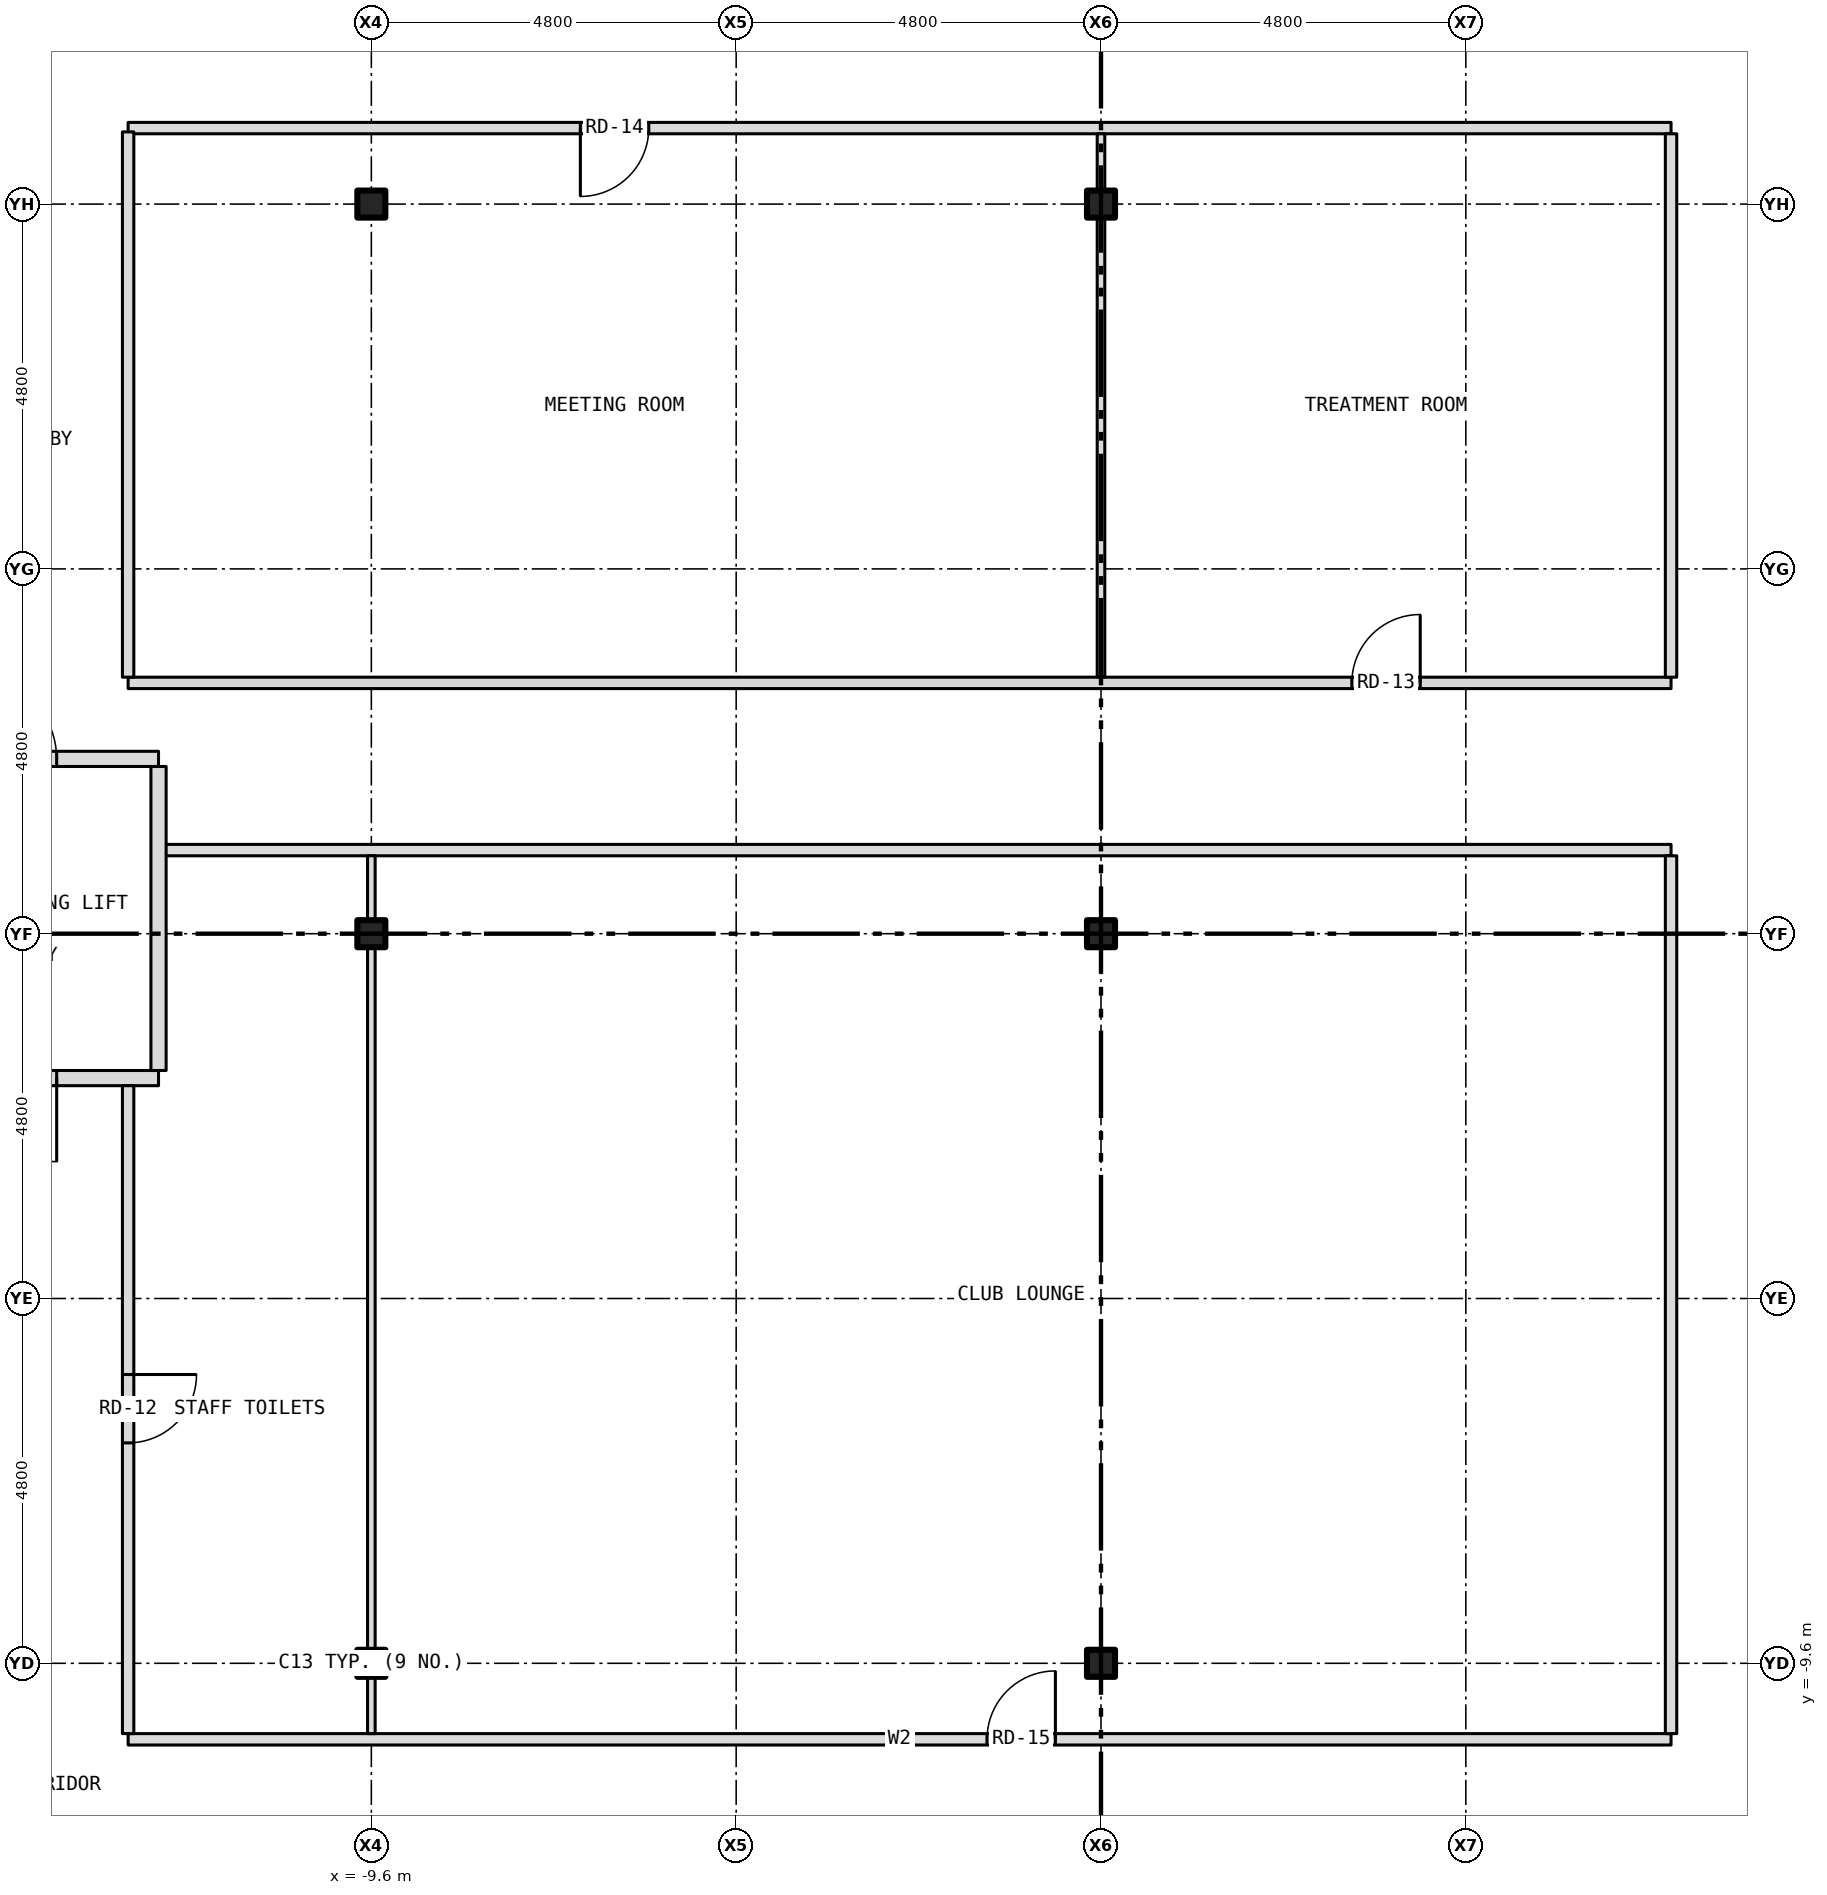
"""IFC4 building model, lengths in metres.
Left out: names, types, materials, properties, quantities, classifications, styles, units other than length and angle.
Written with IfcOpenShell. Run it as: python <this file> out.ifc"""

import sys

from ifc_helpers import new_model, si_unit, direction, frame, frame_2d, origin, origin_2d, place, context, subcontext, project, spatial, rectangle, i_section, extrude, element, fill, save


model = new_model("IFC4")
c1 = context("Model", 3, precision=1e-05, world=origin(), true_north=direction((0.0, 1.0)))
c2 = subcontext(c1, "Body", "Model", "MODEL_VIEW")
j1 = project(units=[si_unit("LENGTHUNIT", "METRE"), si_unit("PLANEANGLEUNIT", "RADIAN")], contexts=[c1])
p1 = place(None, origin())
s1 = spatial("IfcSite", under=j1, at=p1, CompositionType="ELEMENT")
p2 = place(p1, origin())
s2 = spatial("IfcBuilding", under=s1, at=p2, CompositionType="ELEMENT")
p3 = place(p2, frame((0.0, 0.0, 244.5)))
s3 = spatial("IfcBuildingStorey", under=s2, at=p3, CompositionType="ELEMENT", Elevation=244.5)
for number, where, z_axis, x_axis in (
    (1, (-9.6, -9.6, -0.15), (0.0, 0.0, 1.0), (1.0, 0.0, 0.0)),
    (2, (-9.6, 0.0, -0.15), (0.0, 0.0, 1.0), (1.0, 0.0, 0.0)),
    (3, (-9.6, 9.6, -0.15), (0.0, 0.0, 1.0), (1.0, 0.0, 0.0)),
    (4, (0.0, -9.6, -0.15), (0.0, 0.0, 1.0), (1.0, 0.0, 0.0)),
    (5, (0.0, 0.0, -0.15), (0.0, 0.0, 1.0), (1.0, 0.0, 0.0)),
    (6, (0.0, 9.6, -0.15), (0.0, 0.0, 1.0), (1.0, 0.0, 0.0)),
):
    element("IfcColumn", number, at=place(p3, frame(where, z_axis=z_axis, x_axis=x_axis)), inside=s3, PredefinedType="COLUMN", context=c2, shape_type="SweptSolid", body=[
        extrude(i_section(OverallWidth=0.368, OverallDepth=0.356, WebThickness=0.011, FlangeThickness=0.018, at=origin_2d()), origin(), (0.0, 0.0, 1.0), 3.5),
    ])
p4 = place(p3, frame((-12.8, -10.6, 0.0), z_axis=(0.0, 0.0, 1.0), x_axis=(1.0, 0.0, 0.0)))
e7 = element("IfcWall", 7, at=p4, inside=s3, PredefinedType="PARTITIONING", context=c2, shape_type="SweptSolid", body=[
    extrude(rectangle(XDim=20.3, YDim=0.15, at=frame_2d((10.15, 0.0))), origin(), (0.0, 0.0, 1.0), 3.35),
])
p5 = place(p4, frame((11.3, 0.0, 0.0)))
e8 = element("IfcOpeningElement", 8, at=p5, cuts=e7, PredefinedType="OPENING", context=c2, shape_type="SweptSolid", body=[
    extrude(rectangle(XDim=0.9, YDim=2.1, at=frame_2d((0.45, 1.05))), frame((0.0, 0.087, 0.0), z_axis=(0.0, -1.0, 0.0), x_axis=(1.0, 0.0, 0.0)), (0.0, 0.0, 1.0), 0.174),
])
p6 = place(p3, frame((-15.68, -1.9, 0.0), z_axis=(0.0, 0.0, 1.0), x_axis=(1.0, 0.0, 0.0)))
e9 = element("IfcWall", 9, at=p6, inside=s3, PredefinedType="PARTITIONING", context=c2, shape_type="SweptSolid", body=[
    extrude(rectangle(XDim=3.28, YDim=0.2, at=frame_2d((1.64, 0.0))), origin(), (0.0, 0.0, 1.0), 3.35),
])
p7 = place(p6, frame((0.84, 0.0, 0.0)))
e10 = element("IfcOpeningElement", 10, at=p7, cuts=e9, PredefinedType="OPENING", context=c2, shape_type="SweptSolid", body=[
    extrude(rectangle(XDim=1.1, YDim=2.1, at=frame_2d((0.55, 1.05))), frame((0.0, 0.112, 0.0), z_axis=(0.0, -1.0, 0.0), x_axis=(1.0, 0.0, 0.0)), (0.0, 0.0, 1.0), 0.224),
])
p8 = place(p3, frame((-12.4, 1.1, 0.0), z_axis=(0.0, 0.0, 1.0), x_axis=(1.0, 0.0, 0.0)))
e11 = element("IfcWall", 11, at=p8, inside=s3, PredefinedType="PARTITIONING", context=c2, shape_type="SweptSolid", body=[
    extrude(rectangle(XDim=19.9, YDim=0.15, at=frame_2d((9.95, 0.0))), origin(), (0.0, 0.0, 1.0), 3.35),
])
p9 = place(p3, frame((-15.68, 2.3, 0.0), z_axis=(0.0, 0.0, 1.0), x_axis=(1.0, 0.0, 0.0)))
e12 = element("IfcWall", 12, at=p9, inside=s3, PredefinedType="PARTITIONING", context=c2, shape_type="SweptSolid", body=[
    extrude(rectangle(XDim=3.28, YDim=0.2, at=frame_2d((1.64, 0.0))), origin(), (0.0, 0.0, 1.0), 3.35),
])
p10 = place(p9, frame((0.84, 0.0, 0.0)))
e13 = element("IfcOpeningElement", 13, at=p10, cuts=e12, PredefinedType="OPENING", context=c2, shape_type="SweptSolid", body=[
    extrude(rectangle(XDim=1.1, YDim=2.1, at=frame_2d((0.55, 1.05))), frame((0.0, 0.112, 0.0), z_axis=(0.0, -1.0, 0.0), x_axis=(1.0, 0.0, 0.0)), (0.0, 0.0, 1.0), 0.224),
])
p11 = place(p3, frame((-12.8, 3.3, 0.0), z_axis=(0.0, 0.0, 1.0), x_axis=(1.0, 0.0, 0.0)))
e14 = element("IfcWall", 14, at=p11, inside=s3, PredefinedType="PARTITIONING", context=c2, shape_type="SweptSolid", body=[
    extrude(rectangle(XDim=20.3, YDim=0.15, at=frame_2d((10.15, 0.0))), origin(), (0.0, 0.0, 1.0), 3.35),
])
p12 = place(p11, frame((16.1, 0.0, 0.0)))
e15 = element("IfcOpeningElement", 15, at=p12, cuts=e14, PredefinedType="OPENING", context=c2, shape_type="SweptSolid", body=[
    extrude(rectangle(XDim=0.9, YDim=2.1, at=frame_2d((0.45, 1.05))), frame((0.0, 0.087, 0.0), z_axis=(0.0, -1.0, 0.0), x_axis=(1.0, 0.0, 0.0)), (0.0, 0.0, 1.0), 0.174),
])
p13 = place(p3, frame((-12.8, 10.6, 0.0), z_axis=(0.0, 0.0, 1.0), x_axis=(1.0, 0.0, 0.0)))
e16 = element("IfcWall", 16, at=p13, inside=s3, PredefinedType="PARTITIONING", context=c2, shape_type="SweptSolid", body=[
    extrude(rectangle(XDim=20.3, YDim=0.15, at=frame_2d((10.15, 0.0))), origin(), (0.0, 0.0, 1.0), 3.35),
])
p14 = place(p13, frame((5.95, 0.0, 0.0)))
e17 = element("IfcOpeningElement", 17, at=p14, cuts=e16, PredefinedType="OPENING", context=c2, shape_type="SweptSolid", body=[
    extrude(rectangle(XDim=0.9, YDim=2.1, at=frame_2d((0.45, 1.05))), frame((0.0, 0.087, 0.0), z_axis=(0.0, -1.0, 0.0), x_axis=(1.0, 0.0, 0.0)), (0.0, 0.0, 1.0), 0.174),
])
p15 = place(p3, frame((-12.8, -10.525, 0.0), z_axis=(0.0, 0.0, 1.0), x_axis=(0.0, 1.0, 0.0)))
e18 = element("IfcWall", 18, at=p15, inside=s3, PredefinedType="PARTITIONING", context=c2, shape_type="SweptSolid", body=[
    extrude(rectangle(XDim=8.525, YDim=0.15, at=frame_2d((4.262, 0.0))), origin(), (0.0, 0.0, 1.0), 3.35),
])
p16 = place(p15, frame((3.825, 0.0, 0.0)))
e19 = element("IfcOpeningElement", 19, at=p16, cuts=e18, PredefinedType="OPENING", context=c2, shape_type="SweptSolid", body=[
    extrude(rectangle(XDim=0.9, YDim=2.1, at=frame_2d((0.45, 1.05))), frame((0.0, 0.087, 0.0), z_axis=(0.0, -1.0, 0.0), x_axis=(1.0, 0.0, 0.0)), (0.0, 0.0, 1.0), 0.174),
])
p17 = place(p3, frame((-12.8, 3.375, 0.0), z_axis=(0.0, 0.0, 1.0), x_axis=(0.0, 1.0, 0.0)))
e20 = element("IfcWall", 20, at=p17, inside=s3, PredefinedType="PARTITIONING", context=c2, shape_type="SweptSolid", body=[
    extrude(rectangle(XDim=7.175, YDim=0.15, at=frame_2d((3.587, 0.0))), origin(), (0.0, 0.0, 1.0), 3.35),
])
p18 = place(p3, frame((-12.4, -1.8, 0.0), z_axis=(0.0, 0.0, 1.0), x_axis=(0.0, 1.0, 0.0)))
e21 = element("IfcWall", 21, at=p18, inside=s3, PredefinedType="PARTITIONING", context=c2, shape_type="SweptSolid", body=[
    extrude(rectangle(XDim=4.0, YDim=0.2, at=frame_2d((2.0, 0.0))), origin(), (0.0, 0.0, 1.0), 3.35),
])
p19 = place(p3, frame((-9.6, -10.525, 0.0), z_axis=(0.0, 0.0, 1.0), x_axis=(0.0, 1.0, 0.0)))
e22 = element("IfcWall", 22, at=p19, inside=s3, PredefinedType="PARTITIONING", context=c2, shape_type="SweptSolid", body=[
    extrude(rectangle(XDim=0.741, YDim=0.1, at=frame_2d((0.371, 0.0))), origin(), (0.0, 0.0, 1.0), 2.728),
])
p20 = place(p3, frame((-9.6, -9.784, 0.0), z_axis=(0.0, 0.0, 1.0), x_axis=(0.0, 1.0, 0.0)))
e23 = element("IfcWall", 23, at=p20, inside=s3, PredefinedType="PARTITIONING", context=c2, shape_type="SweptSolid", body=[
    extrude(rectangle(XDim=0.368, YDim=0.1, at=frame_2d((0.184, 0.0))), origin(), (0.0, 0.0, 1.0), 3.35),
])
p21 = place(p3, frame((-9.6, -9.416, 0.0), z_axis=(0.0, 0.0, 1.0), x_axis=(0.0, 1.0, 0.0)))
e24 = element("IfcWall", 24, at=p21, inside=s3, PredefinedType="PARTITIONING", context=c2, shape_type="SweptSolid", body=[
    extrude(rectangle(XDim=9.232, YDim=0.1, at=frame_2d((4.616, 0.0))), origin(), (0.0, 0.0, 1.0), 2.728),
])
p22 = place(p3, frame((-9.6, -0.184, 0.0), z_axis=(0.0, 0.0, 1.0), x_axis=(0.0, 1.0, 0.0)))
e25 = element("IfcWall", 25, at=p22, inside=s3, PredefinedType="PARTITIONING", context=c2, shape_type="SweptSolid", body=[
    extrude(rectangle(XDim=0.368, YDim=0.1, at=frame_2d((0.184, 0.0))), origin(), (0.0, 0.0, 1.0), 3.35),
])
p23 = place(p3, frame((-9.6, 0.184, 0.0), z_axis=(0.0, 0.0, 1.0), x_axis=(0.0, 1.0, 0.0)))
e26 = element("IfcWall", 26, at=p23, inside=s3, PredefinedType="PARTITIONING", context=c2, shape_type="SweptSolid", body=[
    extrude(rectangle(XDim=0.841, YDim=0.1, at=frame_2d((0.42, 0.0))), origin(), (0.0, 0.0, 1.0), 2.728),
])
p24 = place(p3, frame((0.0, 3.375, 0.0), z_axis=(0.0, 0.0, 1.0), x_axis=(0.0, 1.0, 0.0)))
e27 = element("IfcWall", 27, at=p24, inside=s3, PredefinedType="PARTITIONING", context=c2, shape_type="SweptSolid", body=[
    extrude(rectangle(XDim=6.041, YDim=0.1, at=frame_2d((3.021, 0.0))), origin(), (0.0, 0.0, 1.0), 2.728),
])
p25 = place(p3, frame((0.0, 9.416, 0.0), z_axis=(0.0, 0.0, 1.0), x_axis=(0.0, 1.0, 0.0)))
e28 = element("IfcWall", 28, at=p25, inside=s3, PredefinedType="PARTITIONING", context=c2, shape_type="SweptSolid", body=[
    extrude(rectangle(XDim=0.368, YDim=0.1, at=frame_2d((0.184, 0.0))), origin(), (0.0, 0.0, 1.0), 3.35),
])
p26 = place(p3, frame((0.0, 9.784, 0.0), z_axis=(0.0, 0.0, 1.0), x_axis=(0.0, 1.0, 0.0)))
e29 = element("IfcWall", 29, at=p26, inside=s3, PredefinedType="PARTITIONING", context=c2, shape_type="SweptSolid", body=[
    extrude(rectangle(XDim=0.741, YDim=0.1, at=frame_2d((0.371, 0.0))), origin(), (0.0, 0.0, 1.0), 2.728),
])
p27 = place(p3, frame((7.5, -10.525, 0.0), z_axis=(0.0, 0.0, 1.0), x_axis=(0.0, 1.0, 0.0)))
e30 = element("IfcWall", 30, at=p27, inside=s3, PredefinedType="PARTITIONING", context=c2, shape_type="SweptSolid", body=[
    extrude(rectangle(XDim=11.55, YDim=0.15, at=frame_2d((5.775, 0.0))), origin(), (0.0, 0.0, 1.0), 3.35),
])
p28 = place(p3, frame((7.5, 3.375, 0.0), z_axis=(0.0, 0.0, 1.0), x_axis=(0.0, 1.0, 0.0)))
e31 = element("IfcWall", 31, at=p28, inside=s3, PredefinedType="PARTITIONING", context=c2, shape_type="SweptSolid", body=[
    extrude(rectangle(XDim=7.15, YDim=0.15, at=frame_2d((3.575, 0.0))), origin(), (0.0, 0.0, 1.0), 3.35),
])
p29 = place(p7, origin())
e32 = element("IfcDoor", 32, at=p29, inside=s3, OperationType="SINGLE_SWING_RIGHT", PredefinedType="DOOR", context=c2, shape_type="SweptSolid", body=[
    extrude(rectangle(XDim=1.1, YDim=2.1, at=frame_2d((0.55, 1.05))), frame((0.0, 0.025, 0.0), z_axis=(0.0, -1.0, 0.0), x_axis=(1.0, 0.0, 0.0)), (0.0, 0.0, 1.0), 0.05),
])
fill(e10, e32)
p30 = place(p10, origin())
e33 = element("IfcDoor", 33, at=p30, inside=s3, OperationType="SINGLE_SWING_LEFT", PredefinedType="DOOR", context=c2, shape_type="SweptSolid", body=[
    extrude(rectangle(XDim=1.1, YDim=2.1, at=frame_2d((0.55, 1.05))), frame((0.0, 0.025, 0.0), z_axis=(0.0, -1.0, 0.0), x_axis=(1.0, 0.0, 0.0)), (0.0, 0.0, 1.0), 0.05),
])
fill(e13, e33)
p31 = place(p16, origin())
e34 = element("IfcDoor", 34, at=p31, inside=s3, OperationType="SINGLE_SWING_RIGHT", PredefinedType="DOOR", context=c2, shape_type="SweptSolid", body=[
    extrude(rectangle(XDim=0.9, YDim=2.1, at=frame_2d((0.45, 1.05))), frame((0.0, 0.025, 0.0), z_axis=(0.0, -1.0, 0.0), x_axis=(1.0, 0.0, 0.0)), (0.0, 0.0, 1.0), 0.05),
])
fill(e19, e34)
p32 = place(p12, origin())
e35 = element("IfcDoor", 35, at=p32, inside=s3, OperationType="SINGLE_SWING_RIGHT", PredefinedType="DOOR", context=c2, shape_type="SweptSolid", body=[
    extrude(rectangle(XDim=0.9, YDim=2.1, at=frame_2d((0.45, 1.05))), frame((0.0, 0.025, 0.0), z_axis=(0.0, -1.0, 0.0), x_axis=(1.0, 0.0, 0.0)), (0.0, 0.0, 1.0), 0.05),
])
fill(e15, e35)
p33 = place(p14, origin())
e36 = element("IfcDoor", 36, at=p33, inside=s3, OperationType="SINGLE_SWING_LEFT", PredefinedType="DOOR", context=c2, shape_type="SweptSolid", body=[
    extrude(rectangle(XDim=0.9, YDim=2.1, at=frame_2d((0.45, 1.05))), frame((0.0, 0.025, 0.0), z_axis=(0.0, -1.0, 0.0), x_axis=(1.0, 0.0, 0.0)), (0.0, 0.0, 1.0), 0.05),
])
fill(e17, e36)
p34 = place(p5, origin())
e37 = element("IfcDoor", 37, at=p34, inside=s3, OperationType="SINGLE_SWING_RIGHT", PredefinedType="DOOR", context=c2, shape_type="SweptSolid", body=[
    extrude(rectangle(XDim=0.9, YDim=2.1, at=frame_2d((0.45, 1.05))), frame((0.0, 0.025, 0.0), z_axis=(0.0, -1.0, 0.0), x_axis=(1.0, 0.0, 0.0)), (0.0, 0.0, 1.0), 0.05),
])
fill(e8, e37)
save(model, sys.argv[1])
